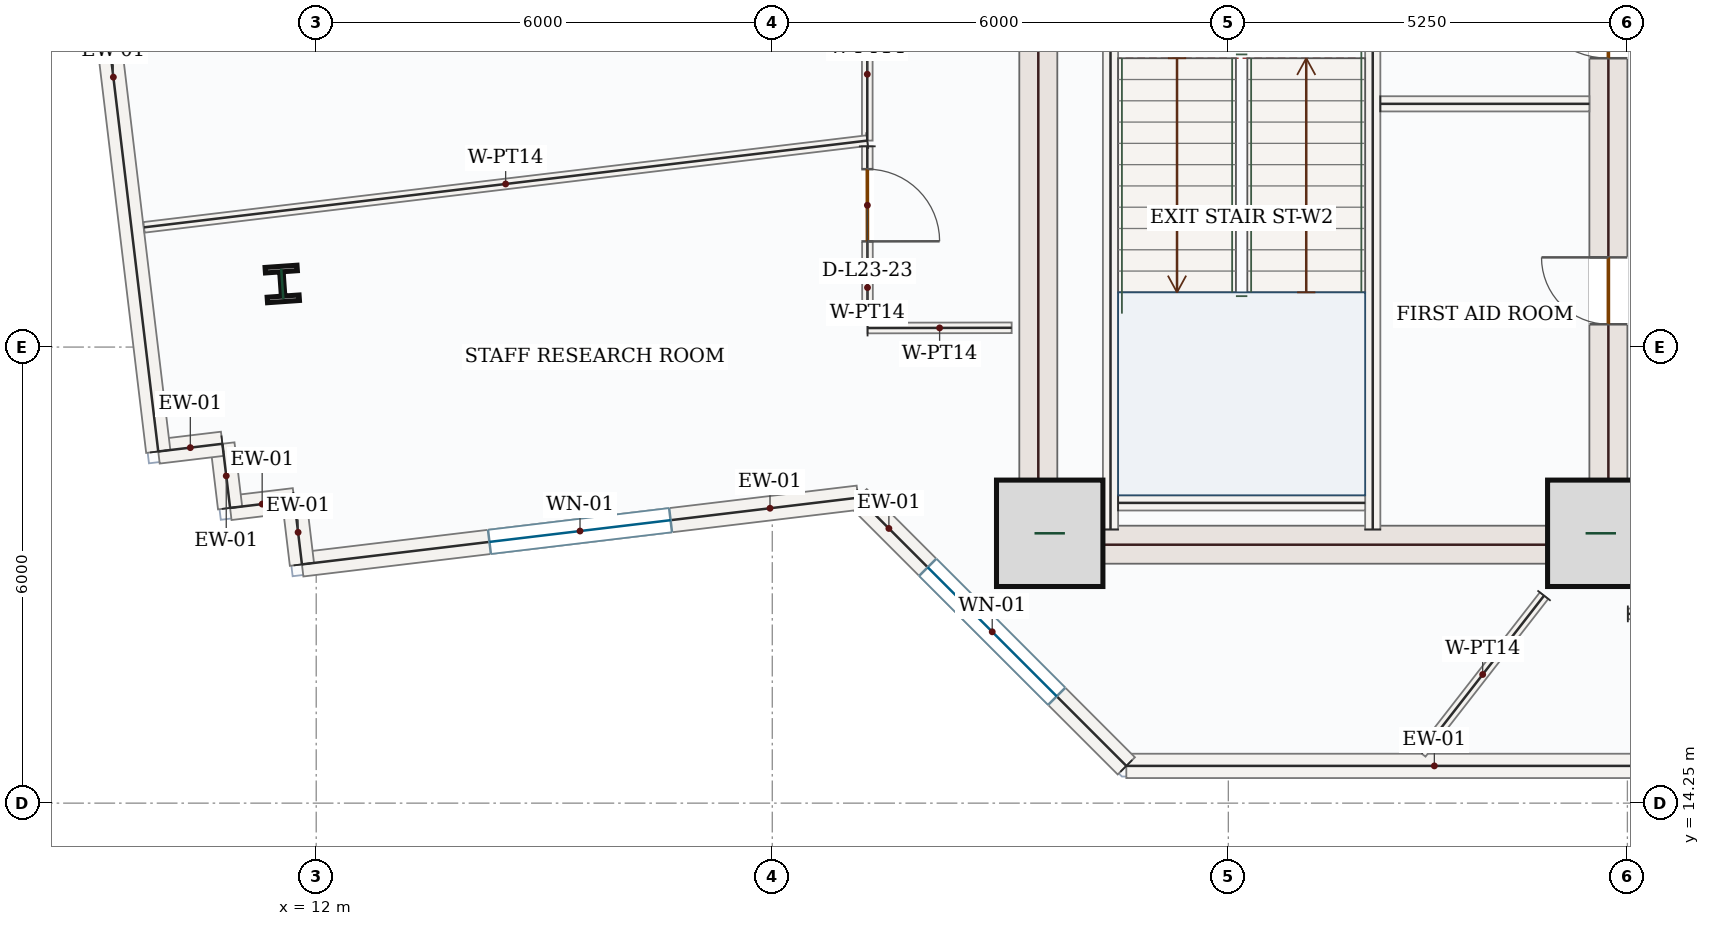
"""IFC4 building model, lengths in metres.
Left out: names, types, materials, properties, quantities, classifications, styles, units other than length and angle.
Written with IfcOpenShell. Run it as: python <this file> out.ifc"""

import sys

from ifc_helpers import new_model, si_unit, direction, frame, frame_2d, origin, origin_2d, place, context, subcontext, project, spatial, rectangle, i_section, extrude, source, transform, mapped, element, fill, save


model = new_model("IFC4")
c1 = context("Model", 3, precision=1e-05, world=origin(), true_north=direction((0.0, 1.0)))
c2 = subcontext(c1, "Body", "Model", "MODEL_VIEW")
j1 = project(units=[si_unit("LENGTHUNIT", "METRE"), si_unit("PLANEANGLEUNIT", "RADIAN")], contexts=[c1])
p1 = place(None, origin())
s1 = spatial("IfcSite", under=j1, at=p1, CompositionType="ELEMENT")
p2 = place(p1, origin())
s2 = spatial("IfcBuilding", under=s1, at=p2, CompositionType="ELEMENT")
p3 = place(p2, frame((0.0, 0.0, 104.7)))
s3 = spatial("IfcBuildingStorey", under=s2, at=p3, CompositionType="ELEMENT", Elevation=104.7)
m1 = source(origin(), c2, "Body", "SweptSolid", [
    extrude(rectangle(XDim=8.55, YDim=0.5, at=frame_2d((4.275, 0.0))), origin(), (0.0, 0.0, 1.0), 3.95),
])
p4 = place(p3, frame((21.5, 17.4, 0.0), z_axis=(0.0, 0.0, 1.0), x_axis=(0.0, 1.0, 0.0)))
e1 = element("IfcWall", 1, at=p4, inside=s3, PredefinedType="SHEAR", context=c2, shape_type="MappedRepresentation", body=[
    mapped(m1, transform((0.0, 0.0, 0.0), x_axis=(1.0, 0.0, 0.0), y_axis=(0.0, 1.0, 0.0), z_axis=(0.0, 0.0, 1.0), scale=1.0)),
])
p5 = place(p3, frame((29.0, 17.4, 0.0), z_axis=(0.0, 0.0, 1.0), x_axis=(0.0, 1.0, 0.0)))
e2 = element("IfcWall", 2, at=p5, inside=s3, PredefinedType="SHEAR", context=c2, shape_type="SweptSolid", body=[
    extrude(rectangle(XDim=8.55, YDim=0.5, at=frame_2d((4.275, 0.0))), origin(), (0.0, 0.0, 1.0), 3.95),
])
p6 = place(p5, frame((6.65, 0.0, 0.0)))
e3 = element("IfcOpeningElement", 3, at=p6, cuts=e2, PredefinedType="OPENING", context=c2, shape_type="SweptSolid", body=[
    extrude(rectangle(XDim=1.1, YDim=2.2, at=frame_2d((0.55, 1.1))), frame((0.0, 0.26, 0.0), z_axis=(0.0, -1.0, 0.0), x_axis=(1.0, 0.0, 0.0)), (0.0, 0.0, 1.0), 0.52),
])
p7 = place(p5, frame((3.15, 0.0, 0.0)))
e4 = element("IfcOpeningElement", 4, at=p7, cuts=e2, PredefinedType="OPENING", context=c2, shape_type="SweptSolid", body=[
    extrude(rectangle(XDim=0.88, YDim=2.1, at=frame_2d((0.44, 1.05))), frame((0.0, 0.26, 0.0), z_axis=(0.0, -1.0, 0.0), x_axis=(1.0, 0.0, 0.0)), (0.0, 0.0, 1.0), 0.52),
])
m2 = source(origin(), c2, "Body", "SweptSolid", [
    extrude(rectangle(XDim=7.0, YDim=0.5, at=frame_2d((3.5, 0.0))), origin(), (0.0, 0.0, 1.0), 3.95),
])
p8 = place(p3, frame((21.75, 17.65, 0.0), z_axis=(0.0, 0.0, 1.0), x_axis=(1.0, 0.0, 0.0)))
e5 = element("IfcWall", 5, at=p8, inside=s3, PredefinedType="SHEAR", context=c2, shape_type="MappedRepresentation", body=[
    mapped(m2, transform((0.0, 0.0, 0.0), x_axis=(1.0, 0.0, 0.0), y_axis=(0.0, 1.0, 0.0), z_axis=(0.0, 0.0, 1.0), scale=1.0)),
])
m3 = source(origin(), c2, "Body", "SweptSolid", [
    extrude(rectangle(XDim=1.4, YDim=1.4, at=origin_2d()), origin(), (0.0, 0.0, 1.0), 4.2),
])
for number, where, z_axis, x_axis in (
    (6, (21.65, 17.8, 0.0), (0.0, 0.0, 1.0), (1.0, 0.0, 0.0)),
    (7, (28.9, 17.8, 0.0), (0.0, 0.0, 1.0), (1.0, 0.0, 0.0)),
):
    element("IfcColumn", number, at=place(p3, frame(where, z_axis=z_axis, x_axis=x_axis)), inside=s3, PredefinedType="COLUMN", context=c2, shape_type="MappedRepresentation", body=[
        mapped(m3, transform((0.0, 0.0, 0.0), x_axis=(1.0, 0.0, 0.0), y_axis=(0.0, 1.0, 0.0), z_axis=(0.0, 0.0, 1.0), scale=1.0)),
    ])
m4 = source(origin(), c2, "Body", "SweptSolid", [
    extrude(i_section(OverallWidth=0.421, OverallDepth=0.465, WebThickness=0.045, FlangeThickness=0.073, FilletRadius=0.018, at=origin_2d()), origin(), (0.0, 0.0, 1.0), 4.2),
])
p9 = place(p3, frame((11.553, 21.08, 0.0), z_axis=(0.0, 0.0, 1.0), x_axis=(0.99756405026, 0.069756473744, 0.0)))
e8 = element("IfcColumn", 8, at=p9, inside=s3, PredefinedType="COLUMN", context=c2, shape_type="MappedRepresentation", body=[
    mapped(m4, transform((0.0, 0.0, 0.0), x_axis=(1.0, 0.0, 0.0), y_axis=(0.0, 1.0, 0.0), z_axis=(0.0, 0.0, 1.0), scale=1.0)),
])
m5 = source(origin(), c2, "Body", "SweptSolid", [
    extrude(rectangle(XDim=8.105, YDim=0.32, at=frame_2d((4.052, 0.0))), origin(), (0.0, 0.0, 1.0), 3.95),
])
p10 = place(p3, frame((30.763, 14.74, 0.0), z_axis=(0.0, 0.0, 1.0), x_axis=(-1.0, 0.0, 0.0)))
e9 = element("IfcWall", 9, at=p10, inside=s3, PredefinedType="SOLIDWALL", context=c2, shape_type="MappedRepresentation", body=[
    mapped(m5, transform((0.0, 0.0, 0.0), x_axis=(1.0, 0.0, 0.0), y_axis=(0.0, 1.0, 0.0), z_axis=(0.0, 0.0, 1.0), scale=1.0)),
])
p11 = place(p3, frame((22.658, 14.74, 0.0), z_axis=(0.0, 0.0, 1.0), x_axis=(-0.707106781187, 0.707106781187, 0.0)))
e10 = element("IfcWall", 10, at=p11, inside=s3, PredefinedType="SOLIDWALL", context=c2, shape_type="SweptSolid", body=[
    extrude(rectangle(XDim=4.99, YDim=0.32, at=frame_2d((2.495, 0.0))), origin(), (0.0, 0.0, 1.0), 3.95),
])
p12 = place(p11, frame((1.295, 0.0, 0.85)))
e11 = element("IfcOpeningElement", 11, at=p12, cuts=e10, PredefinedType="OPENING", context=c2, shape_type="SweptSolid", body=[
    extrude(rectangle(XDim=2.4, YDim=1.8, at=frame_2d((1.2, 0.9))), frame((0.0, 0.17, 0.0), z_axis=(0.0, -1.0, 0.0), x_axis=(1.0, 0.0, 0.0)), (0.0, 0.0, 1.0), 0.34),
])
p13 = place(p3, frame((19.129, 18.269, 0.0), z_axis=(0.0, 0.0, 1.0), x_axis=(-0.992882794037, -0.119095580547, 0.0)))
e12 = element("IfcWall", 12, at=p13, inside=s3, PredefinedType="SOLIDWALL", context=c2, shape_type="SweptSolid", body=[
    extrude(rectangle(XDim=7.37, YDim=0.32, at=frame_2d((3.685, 0.0))), origin(), (0.0, 0.0, 1.0), 3.95),
])
p14 = place(p13, frame((2.485, 0.0, 0.85)))
e13 = element("IfcOpeningElement", 13, at=p14, cuts=e12, PredefinedType="OPENING", context=c2, shape_type="SweptSolid", body=[
    extrude(rectangle(XDim=2.4, YDim=1.8, at=frame_2d((1.2, 0.9))), frame((0.0, 0.17, 0.0), z_axis=(0.0, -1.0, 0.0), x_axis=(1.0, 0.0, 0.0)), (0.0, 0.0, 1.0), 0.34),
])
m6 = source(origin(), c2, "Body", "SweptSolid", [
    extrude(rectangle(XDim=0.85, YDim=0.32, at=frame_2d((0.425, 0.0))), origin(), (0.0, 0.0, 1.0), 3.95),
])
for number, where, z_axis, x_axis in (
    (14, (11.812, 17.391, 0.0), (0.0, 0.0, 1.0), (-0.119, 0.993, 0.0)),
    (15, (11.711, 18.235, 0.0), (0.0, 0.0, 1.0), (-0.993, -0.119, 0.0)),
):
    element("IfcWall", number, at=place(p3, frame(where, z_axis=z_axis, x_axis=x_axis)), inside=s3, PredefinedType="SOLIDWALL", context=c2, shape_type="MappedRepresentation", body=[
        mapped(m6, transform((0.0, 0.0, 0.0), x_axis=(1.0, 0.0, 0.0), y_axis=(0.0, 1.0, 0.0), z_axis=(0.0, 0.0, 1.0), scale=1.0)),
    ])
m7 = source(origin(), c2, "Body", "SweptSolid", [
    extrude(rectangle(XDim=0.85, YDim=0.32, at=frame_2d((0.425, 0.0))), origin(), (0.0, 0.0, 1.0), 3.95),
])
p15 = place(p3, frame((10.867, 18.134, 0.0), z_axis=(0.0, 0.0, 1.0), x_axis=(-0.11894130009, 0.992901287708, 0.0)))
e16 = element("IfcWall", 16, at=p15, inside=s3, PredefinedType="SOLIDWALL", context=c2, shape_type="MappedRepresentation", body=[
    mapped(m7, transform((0.0, 0.0, 0.0), x_axis=(1.0, 0.0, 0.0), y_axis=(0.0, 1.0, 0.0), z_axis=(0.0, 0.0, 1.0), scale=1.0)),
])
p16 = place(p3, frame((10.766, 18.978, 0.0), z_axis=(0.0, 0.0, 1.0), x_axis=(-0.992905350382, -0.118907380694, 0.0)))
e17 = element("IfcWall", 17, at=p16, inside=s3, PredefinedType="SOLIDWALL", context=c2, shape_type="MappedRepresentation", body=[
    mapped(m6, transform((0.0, 0.0, 0.0), x_axis=(1.0, 0.0, 0.0), y_axis=(0.0, 1.0, 0.0), z_axis=(0.0, 0.0, 1.0), scale=1.0)),
])
m8 = source(origin(), c2, "Body", "SweptSolid", [
    extrude(rectangle(XDim=9.92, YDim=0.32, at=frame_2d((4.96, 0.0))), origin(), (0.0, 0.0, 1.0), 3.95),
])
p17 = place(p3, frame((9.922, 18.876, 0.0), z_axis=(0.0, 0.0, 1.0), x_axis=(-0.119092815244, 0.992883125729, 0.0)))
e18 = element("IfcWall", 18, at=p17, inside=s3, PredefinedType="SOLIDWALL", context=c2, shape_type="MappedRepresentation", body=[
    mapped(m8, transform((0.0, 0.0, 0.0), x_axis=(1.0, 0.0, 0.0), y_axis=(0.0, 1.0, 0.0), z_axis=(0.0, 0.0, 1.0), scale=1.0)),
])
m9 = source(origin(), c2, "Body", "SweptSolid", [
    extrude(rectangle(XDim=7.87, YDim=0.2, at=frame_2d((3.935, 0.0))), origin(), (0.0, 0.0, 1.0), 3.95),
])
p18 = place(p3, frame((22.45, 17.85, 0.0), z_axis=(0.0, 0.0, 1.0), x_axis=(0.0, 1.0, 0.0)))
e19 = element("IfcWall", 19, at=p18, inside=s3, PredefinedType="SOLIDWALL", context=c2, shape_type="MappedRepresentation", body=[
    mapped(m9, transform((0.0, 0.0, 0.0), x_axis=(1.0, 0.0, 0.0), y_axis=(0.0, 1.0, 0.0), z_axis=(0.0, 0.0, 1.0), scale=1.0)),
])
p19 = place(p3, frame((25.9, 17.85, 0.0), z_axis=(0.0, 0.0, 1.0), x_axis=(0.0, 1.0, 0.0)))
e20 = element("IfcWall", 20, at=p19, inside=s3, PredefinedType="SOLIDWALL", context=c2, shape_type="SweptSolid", body=[
    extrude(rectangle(XDim=8.0, YDim=0.2, at=frame_2d((4.0, 0.0))), origin(), (0.0, 0.0, 1.0), 3.95),
])
p20 = place(p19, frame((6.3, 0.0, 0.0)))
e21 = element("IfcOpeningElement", 21, at=p20, cuts=e20, PredefinedType="OPENING", context=c2, shape_type="SweptSolid", body=[
    extrude(rectangle(XDim=1.05, YDim=2.15, at=frame_2d((0.525, 1.075))), frame((0.0, 0.11, 0.0), z_axis=(0.0, -1.0, 0.0), x_axis=(1.0, 0.0, 0.0)), (0.0, 0.0, 1.0), 0.22),
])
m10 = source(origin(), c2, "Body", "SweptSolid", [
    extrude(rectangle(XDim=3.25, YDim=0.2, at=frame_2d((1.625, 0.0))), origin(), (0.0, 0.0, 1.0), 3.95),
])
p21 = place(p3, frame((22.55, 18.2, 0.0), z_axis=(0.0, 0.0, 1.0), x_axis=(1.0, 0.0, 0.0)))
e22 = element("IfcWall", 22, at=p21, inside=s3, PredefinedType="SOLIDWALL", context=c2, shape_type="MappedRepresentation", body=[
    mapped(m10, transform((0.0, 0.0, 0.0), x_axis=(1.0, 0.0, 0.0), y_axis=(0.0, 1.0, 0.0), z_axis=(0.0, 0.0, 1.0), scale=1.0)),
])
m11 = source(origin(), c2, "Body", "SweptSolid", [
    extrude(rectangle(XDim=2.75, YDim=0.2, at=frame_2d((1.375, 0.0))), origin(), (0.0, 0.0, 1.0), 3.95),
])
p22 = place(p3, frame((26.0, 23.45, 0.0), z_axis=(0.0, 0.0, 1.0), x_axis=(1.0, 0.0, 0.0)))
e23 = element("IfcWall", 23, at=p22, inside=s3, PredefinedType="SOLIDWALL", context=c2, shape_type="MappedRepresentation", body=[
    mapped(m11, transform((0.0, 0.0, 0.0), x_axis=(1.0, 0.0, 0.0), y_axis=(0.0, 1.0, 0.0), z_axis=(0.0, 0.0, 1.0), scale=1.0)),
])
p23 = place(p3, frame((19.25, 26.834, 0.0), z_axis=(0.0, 0.0, 1.0), x_axis=(0.0, -1.0, 0.0)))
e24 = element("IfcWall", 24, at=p23, inside=s3, PredefinedType="PARTITIONING", context=c2, shape_type="SweptSolid", body=[
    extrude(rectangle(XDim=3.868, YDim=0.14, at=frame_2d((1.934, 0.0))), origin(), (0.0, 0.0, 1.0), 3.95),
])
p24 = place(p23, frame((1.021, 0.0, 0.0)))
e25 = element("IfcOpeningElement", 25, at=p24, cuts=e24, PredefinedType="OPENING", context=c2, shape_type="SweptSolid", body=[
    extrude(rectangle(XDim=0.95, YDim=2.15, at=frame_2d((0.475, 1.075))), frame((0.0, 0.08, 0.0), z_axis=(0.0, -1.0, 0.0), x_axis=(1.0, 0.0, 0.0)), (0.0, 0.0, 1.0), 0.16),
])
m12 = source(origin(), c2, "Body", "SweptSolid", [
    extrude(rectangle(XDim=9.584, YDim=0.14, at=frame_2d((4.792, 0.0))), origin(), (0.0, 0.0, 1.0), 3.95),
])
p25 = place(p3, frame((19.25, 22.966, 0.0), z_axis=(0.0, 0.0, 1.0), x_axis=(-0.992883225705, -0.119091981737, 0.0)))
e26 = element("IfcWall", 26, at=p25, inside=s3, PredefinedType="PARTITIONING", context=c2, shape_type="MappedRepresentation", body=[
    mapped(m12, transform((0.0, 0.0, 0.0), x_axis=(1.0, 0.0, 0.0), y_axis=(0.0, 1.0, 0.0), z_axis=(0.0, 0.0, 1.0), scale=1.0)),
])
m13 = source(origin(), c2, "Body", "SweptSolid", [
    extrude(rectangle(XDim=1.896, YDim=0.14, at=frame_2d((0.948, 0.0))), origin(), (0.0, 0.0, 1.0), 3.95),
])
p26 = place(p3, frame((19.253, 20.5, 0.0), z_axis=(0.0, 0.0, 1.0), x_axis=(0.999998598926, 0.001673961085, 0.0)))
e27 = element("IfcWall", 27, at=p26, inside=s3, PredefinedType="PARTITIONING", context=c2, shape_type="MappedRepresentation", body=[
    mapped(m13, transform((0.0, 0.0, 0.0), x_axis=(1.0, 0.0, 0.0), y_axis=(0.0, 1.0, 0.0), z_axis=(0.0, 0.0, 1.0), scale=1.0)),
])
m14 = source(origin(), c2, "Body", "SweptSolid", [
    extrude(rectangle(XDim=2.629, YDim=0.14, at=frame_2d((1.315, 0.0))), origin(), (0.0, 0.0, 1.0), 3.95),
])
p27 = place(p3, frame((28.154, 16.98, 0.0), z_axis=(0.0, 0.0, 1.0), x_axis=(-0.614210560268, -0.789142184689, 0.0)))
e28 = element("IfcWall", 28, at=p27, inside=s3, PredefinedType="PARTITIONING", context=c2, shape_type="MappedRepresentation", body=[
    mapped(m14, transform((0.0, 0.0, 0.0), x_axis=(1.0, 0.0, 0.0), y_axis=(0.0, 1.0, 0.0), z_axis=(0.0, 0.0, 1.0), scale=1.0)),
])
p28 = place(p3, frame((19.25, 22.891, 0.0), z_axis=(0.0, 0.0, 1.0), x_axis=(0.001476168784, -0.999998910462, 0.0)))
e29 = element("IfcWall", 29, at=p28, inside=s3, PredefinedType="PARTITIONING", context=c2, shape_type="SweptSolid", body=[
    extrude(rectangle(XDim=2.315, YDim=0.14, at=frame_2d((1.158, 0.0))), origin(), (0.0, 0.0, 1.0), 3.95),
])
p29 = place(p28, frame((0.3, 0.0, 0.0)))
e30 = element("IfcOpeningElement", 30, at=p29, cuts=e29, PredefinedType="OPENING", context=c2, shape_type="SweptSolid", body=[
    extrude(rectangle(XDim=0.95, YDim=2.15, at=frame_2d((0.475, 1.075))), frame((0.0, 0.08, 0.0), z_axis=(0.0, -1.0, 0.0), x_axis=(1.0, 0.0, 0.0)), (0.0, 0.0, 1.0), 0.16),
])
p30 = place(p3, frame((29.256, 16.74, 0.0), z_axis=(0.0, 0.0, 1.0), x_axis=(1.0, 0.0, 0.0)))
e31 = element("IfcWall", 31, at=p30, inside=s3, PredefinedType="PARTITIONING", context=c2, shape_type="SweptSolid", body=[
    extrude(rectangle(XDim=13.488, YDim=0.14, at=frame_2d((6.744, 0.0))), origin(), (0.0, 0.0, 1.0), 3.95),
])
p31 = place(p30, frame((6.269, 0.0, 0.0)))
e32 = element("IfcOpeningElement", 32, at=p31, cuts=e31, PredefinedType="OPENING", context=c2, shape_type="SweptSolid", body=[
    extrude(rectangle(XDim=0.95, YDim=2.15, at=frame_2d((0.475, 1.075))), frame((0.0, 0.08, 0.0), z_axis=(0.0, -1.0, 0.0), x_axis=(1.0, 0.0, 0.0)), (0.0, 0.0, 1.0), 0.16),
])
m15 = source(origin(), c2, "Body", "SweptSolid", [
    extrude(rectangle(XDim=2.4, YDim=1.8, at=frame_2d((1.2, 0.9))), frame((0.0, 0.03, 0.0), z_axis=(0.0, -1.0, 0.0), x_axis=(1.0, 0.0, 0.0)), (0.0, 0.0, 1.0), 0.06),
])
p32 = place(p12, origin())
e33 = element("IfcWindow", 33, at=p32, inside=s3, PartitioningType="DOUBLE_PANEL_VERTICAL", PredefinedType="WINDOW", context=c2, shape_type="MappedRepresentation", body=[
    mapped(m15, transform((0.0, 0.0, 0.0), x_axis=(1.0, 0.0, 0.0), y_axis=(0.0, 1.0, 0.0), z_axis=(0.0, 0.0, 1.0), scale=1.0)),
])
fill(e11, e33)
p33 = place(p14, origin())
e34 = element("IfcWindow", 34, at=p33, inside=s3, PartitioningType="DOUBLE_PANEL_VERTICAL", PredefinedType="WINDOW", context=c2, shape_type="MappedRepresentation", body=[
    mapped(m15, transform((0.0, 0.0, 0.0), x_axis=(1.0, 0.0, 0.0), y_axis=(0.0, 1.0, 0.0), z_axis=(0.0, 0.0, 1.0), scale=1.0)),
])
fill(e13, e34)
m16 = source(origin(), c2, "Body", "SweptSolid", [
    extrude(rectangle(XDim=1.1, YDim=2.2, at=frame_2d((0.55, 1.1))), frame((0.0, 0.025, 0.0), z_axis=(0.0, -1.0, 0.0), x_axis=(1.0, 0.0, 0.0)), (0.0, 0.0, 1.0), 0.05),
])
p34 = place(p6, origin())
e35 = element("IfcDoor", 35, at=p34, inside=s3, OperationType="SINGLE_SWING_RIGHT", PredefinedType="DOOR", context=c2, shape_type="MappedRepresentation", body=[
    mapped(m16, transform((0.0, 0.0, 0.0), x_axis=(1.0, 0.0, 0.0), y_axis=(0.0, 1.0, 0.0), z_axis=(0.0, 0.0, 1.0), scale=1.0)),
])
fill(e3, e35)
m17 = source(origin(), c2, "Body", "SweptSolid", [
    extrude(rectangle(XDim=0.88, YDim=2.1, at=frame_2d((0.44, 1.05))), frame((0.0, 0.025, 0.0), z_axis=(0.0, -1.0, 0.0), x_axis=(1.0, 0.0, 0.0)), (0.0, 0.0, 1.0), 0.05),
])
p35 = place(p7, origin())
e36 = element("IfcDoor", 36, at=p35, inside=s3, OperationType="SINGLE_SWING_RIGHT", PredefinedType="DOOR", context=c2, shape_type="MappedRepresentation", body=[
    mapped(m17, transform((0.0, 0.0, 0.0), x_axis=(1.0, 0.0, 0.0), y_axis=(0.0, 1.0, 0.0), z_axis=(0.0, 0.0, 1.0), scale=1.0)),
])
fill(e4, e36)
m18 = source(origin(), c2, "Body", "SweptSolid", [
    extrude(rectangle(XDim=0.95, YDim=2.15, at=frame_2d((0.475, 1.075))), frame((0.0, 0.025, 0.0), z_axis=(0.0, -1.0, 0.0), x_axis=(1.0, 0.0, 0.0)), (0.0, 0.0, 1.0), 0.05),
])
p36 = place(p29, origin())
e37 = element("IfcDoor", 37, at=p36, inside=s3, OperationType="SINGLE_SWING_RIGHT", PredefinedType="DOOR", context=c2, shape_type="MappedRepresentation", body=[
    mapped(m18, transform((0.0, 0.0, 0.0), x_axis=(1.0, 0.0, 0.0), y_axis=(0.0, 1.0, 0.0), z_axis=(0.0, 0.0, 1.0), scale=1.0)),
])
fill(e30, e37)
save(model, sys.argv[1])
